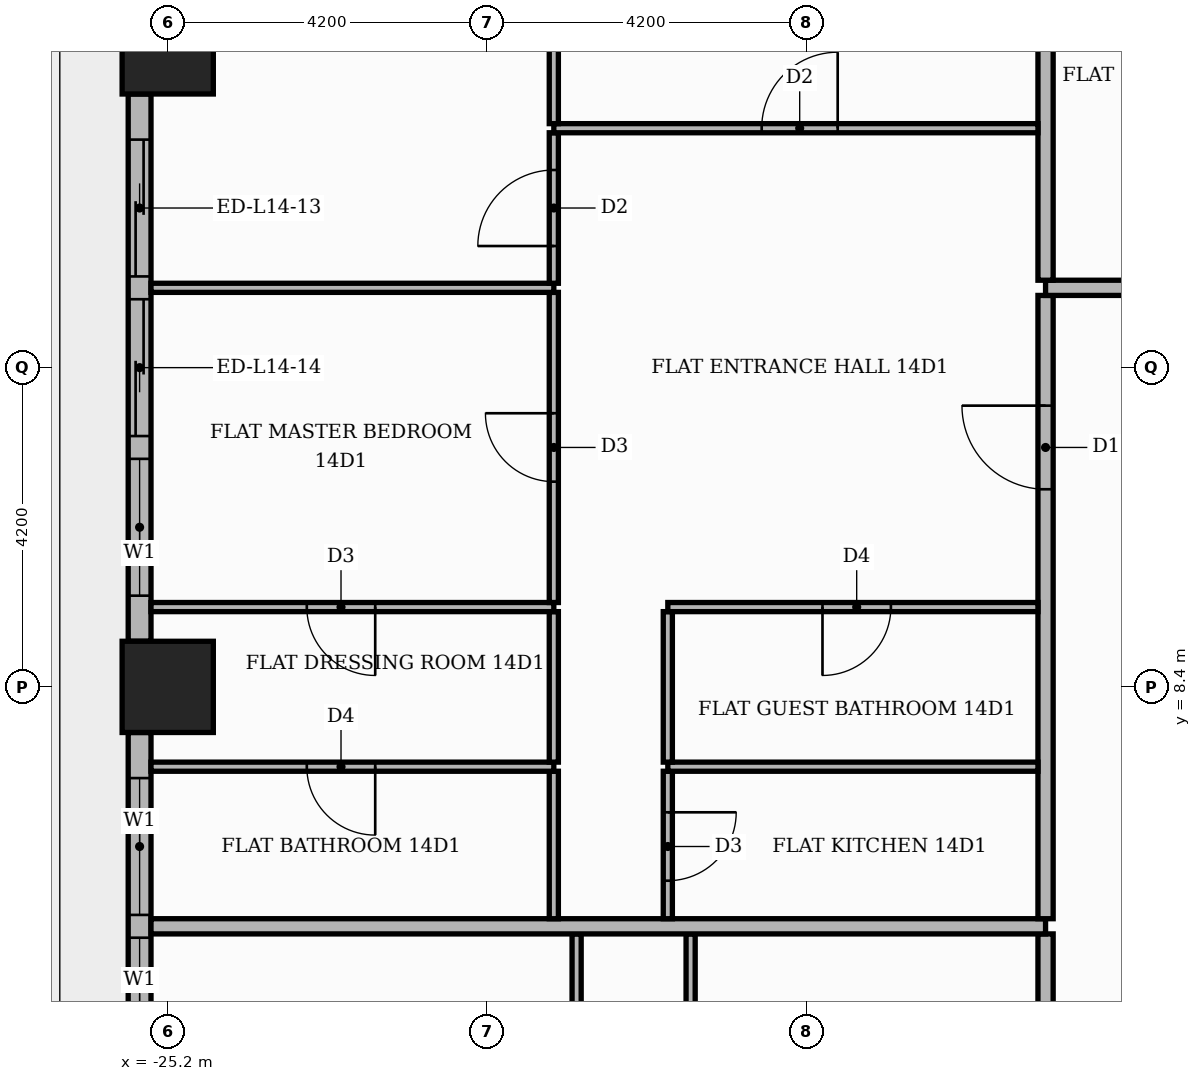
"""IFC4 building model, lengths in metres.
Left out: names, types, materials, properties, quantities, classifications, styles, units other than length and angle.
Written with IfcOpenShell. Run it as: python <this file> out.ifc"""

import sys

from ifc_helpers import new_model, si_unit, direction, frame, frame_2d, origin, origin_2d, place, context, subcontext, project, spatial, rectangle, extrude, element, fill, save


model = new_model("IFC4")
c1 = context("Model", 3, precision=1e-05, world=origin(), true_north=direction((0.0, 1.0)))
c2 = subcontext(c1, "Body", "Model", "MODEL_VIEW")
j1 = project(units=[si_unit("LENGTHUNIT", "METRE"), si_unit("PLANEANGLEUNIT", "RADIAN")], contexts=[c1])
p1 = place(None, origin())
s1 = spatial("IfcSite", under=j1, at=p1, CompositionType="ELEMENT")
p2 = place(p1, origin())
s2 = spatial("IfcBuilding", under=s1, at=p2, CompositionType="ELEMENT")
p3 = place(p2, frame((0.0, 0.0, 62.1)))
s3 = spatial("IfcBuildingStorey", under=s2, at=p3, CompositionType="ELEMENT", Elevation=62.1)
for number, where, z_axis, x_axis in (
    (1, (-25.2, 8.4, 0.0), (0.0, 0.0, 1.0), (1.0, 0.0, 0.0)),
    (2, (-25.2, 16.8, 0.0), (0.0, 0.0, 1.0), (1.0, 0.0, 0.0)),
):
    element("IfcColumn", number, at=place(p3, frame(where, z_axis=z_axis, x_axis=x_axis)), inside=s3, PredefinedType="COLUMN", context=c2, shape_type="SweptSolid", body=[
        extrude(rectangle(XDim=1.2, YDim=1.2, at=origin_2d()), origin(), (0.0, 0.0, 1.0), 3.9),
    ])
p4 = place(p3, frame((-25.57, 16.2, 0.0), z_axis=(0.0, 0.0, 1.0), x_axis=(0.0, -1.0, 0.0)))
e3 = element("IfcWall", 3, at=p4, inside=s3, PredefinedType="STANDARD", context=c2, shape_type="SweptSolid", body=[
    extrude(rectangle(XDim=7.2, YDim=0.3, at=frame_2d((3.6, 0.0))), origin(), (0.0, 0.0, 1.0), 3.48),
])
p5 = place(p4, frame((0.6, 0.0, 0.0)))
e4 = element("IfcOpeningElement", 4, at=p5, cuts=e3, PredefinedType="OPENING", context=c2, shape_type="SweptSolid", body=[
    extrude(rectangle(XDim=1.8, YDim=2.4, at=frame_2d((0.9, 1.2))), frame((0.0, 0.16, 0.0), z_axis=(0.0, -1.0, 0.0), x_axis=(1.0, 0.0, 0.0)), (0.0, 0.0, 1.0), 0.32),
])
p6 = place(p4, frame((2.7, 0.0, 0.0)))
e5 = element("IfcOpeningElement", 5, at=p6, cuts=e3, PredefinedType="OPENING", context=c2, shape_type="SweptSolid", body=[
    extrude(rectangle(XDim=1.8, YDim=2.4, at=frame_2d((0.9, 1.2))), frame((0.0, 0.16, 0.0), z_axis=(0.0, -1.0, 0.0), x_axis=(1.0, 0.0, 0.0)), (0.0, 0.0, 1.0), 0.32),
])
p7 = place(p4, frame((4.8, 0.0, 0.9)))
e6 = element("IfcOpeningElement", 6, at=p7, cuts=e3, PredefinedType="OPENING", context=c2, shape_type="SweptSolid", body=[
    extrude(rectangle(XDim=1.8, YDim=2.1, at=frame_2d((0.9, 1.05))), frame((0.0, 0.16, 0.0), z_axis=(0.0, -1.0, 0.0), x_axis=(1.0, 0.0, 0.0)), (0.0, 0.0, 1.0), 0.32),
])
p8 = place(p3, frame((-25.57, 7.8, 0.0), z_axis=(0.0, 0.0, 1.0), x_axis=(0.0, -1.0, 0.0)))
e7 = element("IfcWall", 7, at=p8, inside=s3, PredefinedType="STANDARD", context=c2, shape_type="SweptSolid", body=[
    extrude(rectangle(XDim=7.2, YDim=0.3, at=frame_2d((3.6, 0.0))), origin(), (0.0, 0.0, 1.0), 3.48),
])
p9 = place(p8, frame((0.6, 0.0, 0.9)))
e8 = element("IfcOpeningElement", 8, at=p9, cuts=e7, PredefinedType="OPENING", context=c2, shape_type="SweptSolid", body=[
    extrude(rectangle(XDim=1.8, YDim=2.1, at=frame_2d((0.9, 1.05))), frame((0.0, 0.16, 0.0), z_axis=(0.0, -1.0, 0.0), x_axis=(1.0, 0.0, 0.0)), (0.0, 0.0, 1.0), 0.32),
])
p10 = place(p8, frame((2.7, 0.0, 0.9)))
e9 = element("IfcOpeningElement", 9, at=p10, cuts=e7, PredefinedType="OPENING", context=c2, shape_type="SweptSolid", body=[
    extrude(rectangle(XDim=1.8, YDim=2.1, at=frame_2d((0.9, 1.05))), frame((0.0, 0.16, 0.0), z_axis=(0.0, -1.0, 0.0), x_axis=(1.0, 0.0, 0.0)), (0.0, 0.0, 1.0), 0.32),
])
p11 = place(p8, frame((4.8, 0.0, 0.0)))
e10 = element("IfcOpeningElement", 10, at=p11, cuts=e7, PredefinedType="OPENING", context=c2, shape_type="SweptSolid", body=[
    extrude(rectangle(XDim=1.8, YDim=2.4, at=frame_2d((0.9, 1.2))), frame((0.0, 0.16, 0.0), z_axis=(0.0, -1.0, 0.0), x_axis=(1.0, 0.0, 0.0)), (0.0, 0.0, 1.0), 0.32),
])
p12 = place(p3, frame((-13.65, -13.55, 0.0), z_axis=(0.0, 0.0, 1.0), x_axis=(0.0, 1.0, 0.0)))
e11 = element("IfcWall", 11, at=p12, inside=s3, PredefinedType="PARTITIONING", context=c2, shape_type="SweptSolid", body=[
    extrude(rectangle(XDim=18.7, YDim=0.2, at=frame_2d((9.35, 0.0))), origin(), (0.0, 0.0, 1.0), 3.48),
])
p13 = place(p12, frame((11.95, 0.0, 0.0)))
e12 = element("IfcOpeningElement", 12, at=p13, cuts=e11, PredefinedType="OPENING", context=c2, shape_type="SweptSolid", body=[
    extrude(rectangle(XDim=1.1, YDim=2.4, at=frame_2d((0.55, 1.2))), frame((0.0, 0.11, 0.0), z_axis=(0.0, -1.0, 0.0), x_axis=(1.0, 0.0, 0.0)), (0.0, 0.0, 1.0), 0.22),
])
p14 = place(p3, frame((-19.82, -3.09, 0.0), z_axis=(0.0, 0.0, 1.0), x_axis=(0.0, 1.0, 0.0)))
e13 = element("IfcWall", 13, at=p14, inside=s3, PredefinedType="PARTITIONING", context=c2, shape_type="SweptSolid", body=[
    extrude(rectangle(XDim=8.24, YDim=0.12, at=frame_2d((4.12, 0.0))), origin(), (0.0, 0.0, 1.0), 3.48),
])
p15 = place(p14, frame((3.64, 0.0, 0.0)))
e14 = element("IfcOpeningElement", 14, at=p15, cuts=e13, PredefinedType="OPENING", context=c2, shape_type="SweptSolid", body=[
    extrude(rectangle(XDim=1.0, YDim=2.1, at=frame_2d((0.5, 1.05))), frame((0.0, 0.07, 0.0), z_axis=(0.0, -1.0, 0.0), x_axis=(1.0, 0.0, 0.0)), (0.0, 0.0, 1.0), 0.14),
])
p16 = place(p3, frame((-18.32, 1.11, 0.0), z_axis=(0.0, 0.0, 1.0), x_axis=(0.0, 1.0, 0.0)))
e15 = element("IfcWall", 15, at=p16, inside=s3, PredefinedType="PARTITIONING", context=c2, shape_type="SweptSolid", body=[
    extrude(rectangle(XDim=4.04, YDim=0.12, at=frame_2d((2.02, 0.0))), origin(), (0.0, 0.0, 1.0), 3.48),
])
p17 = place(p3, frame((-25.42, 5.25, 0.0), z_axis=(0.0, 0.0, 1.0), x_axis=(1.0, 0.0, 0.0)))
e16 = element("IfcWall", 16, at=p17, inside=s3, PredefinedType="PARTITIONING", context=c2, shape_type="SweptSolid", body=[
    extrude(rectangle(XDim=11.77, YDim=0.2, at=frame_2d((5.885, 0.0))), origin(), (0.0, 0.0, 1.0), 3.48),
])
p18 = place(p3, frame((-20.12, 5.35, 0.0), z_axis=(0.0, 0.0, 1.0), x_axis=(0.0, 1.0, 0.0)))
e17 = element("IfcWall", 17, at=p18, inside=s3, PredefinedType="PARTITIONING", context=c2, shape_type="SweptSolid", body=[
    extrude(rectangle(XDim=1.94, YDim=0.12, at=frame_2d((0.97, 0.0))), origin(), (0.0, 0.0, 1.0), 3.48),
])
p19 = place(p3, frame((-18.62, 5.35, 0.0), z_axis=(0.0, 0.0, 1.0), x_axis=(0.0, 1.0, 0.0)))
e18 = element("IfcWall", 18, at=p19, inside=s3, PredefinedType="PARTITIONING", context=c2, shape_type="SweptSolid", body=[
    extrude(rectangle(XDim=1.94, YDim=0.12, at=frame_2d((0.97, 0.0))), origin(), (0.0, 0.0, 1.0), 3.48),
])
p20 = place(p19, frame((0.5, 0.0, 0.0)))
e19 = element("IfcOpeningElement", 19, at=p20, cuts=e18, PredefinedType="OPENING", context=c2, shape_type="SweptSolid", body=[
    extrude(rectangle(XDim=0.9, YDim=2.1, at=frame_2d((0.45, 1.05))), frame((0.0, 0.07, 0.0), z_axis=(0.0, -1.0, 0.0), x_axis=(1.0, 0.0, 0.0)), (0.0, 0.0, 1.0), 0.14),
])
p21 = place(p3, frame((-13.65, 5.35, 0.0), z_axis=(0.0, 0.0, 1.0), x_axis=(0.0, 1.0, 0.0)))
e20 = element("IfcWall", 20, at=p21, inside=s3, PredefinedType="PARTITIONING", context=c2, shape_type="SweptSolid", body=[
    extrude(rectangle(XDim=8.2, YDim=0.2, at=frame_2d((4.1, 0.0))), origin(), (0.0, 0.0, 1.0), 3.48),
])
p22 = place(p21, frame((5.65, 0.0, 0.0)))
e21 = element("IfcOpeningElement", 21, at=p22, cuts=e20, PredefinedType="OPENING", context=c2, shape_type="SweptSolid", body=[
    extrude(rectangle(XDim=1.1, YDim=2.4, at=frame_2d((0.55, 1.2))), frame((0.0, 0.11, 0.0), z_axis=(0.0, -1.0, 0.0), x_axis=(1.0, 0.0, 0.0)), (0.0, 0.0, 1.0), 0.22),
])
p23 = place(p3, frame((-25.42, 7.35, 0.0), z_axis=(0.0, 0.0, 1.0), x_axis=(1.0, 0.0, 0.0)))
e22 = element("IfcWall", 22, at=p23, inside=s3, PredefinedType="PARTITIONING", context=c2, shape_type="SweptSolid", body=[
    extrude(rectangle(XDim=5.3, YDim=0.12, at=frame_2d((2.65, 0.0))), origin(), (0.0, 0.0, 1.0), 3.48),
])
p24 = place(p23, frame((2.05, 0.0, 0.0)))
e23 = element("IfcOpeningElement", 23, at=p24, cuts=e22, PredefinedType="OPENING", context=c2, shape_type="SweptSolid", body=[
    extrude(rectangle(XDim=0.9, YDim=2.1, at=frame_2d((0.45, 1.05))), frame((0.0, 0.07, 0.0), z_axis=(0.0, -1.0, 0.0), x_axis=(1.0, 0.0, 0.0)), (0.0, 0.0, 1.0), 0.14),
])
p25 = place(p3, frame((-18.62, 7.35, 0.0), z_axis=(0.0, 0.0, 1.0), x_axis=(1.0, 0.0, 0.0)))
e24 = element("IfcWall", 24, at=p25, inside=s3, PredefinedType="PARTITIONING", context=c2, shape_type="SweptSolid", body=[
    extrude(rectangle(XDim=4.87, YDim=0.12, at=frame_2d((2.435, 0.0))), origin(), (0.0, 0.0, 1.0), 3.48),
])
for number, where, z_axis, x_axis in (
    (25, (-20.12, 7.41, 0.0), (0.0, 0.0, 1.0), (0.0, 1.0, 0.0)),
    (26, (-18.62, 7.41, 0.0), (0.0, 0.0, 1.0), (0.0, 1.0, 0.0)),
):
    element("IfcWall", number, at=place(p3, frame(where, z_axis=z_axis, x_axis=x_axis)), inside=s3, PredefinedType="PARTITIONING", context=c2, shape_type="SweptSolid", body=[
        extrude(rectangle(XDim=1.98, YDim=0.12, at=frame_2d((0.99, 0.0))), origin(), (0.0, 0.0, 1.0), 3.48),
    ])
p26 = place(p3, frame((-25.42, 9.45, 0.0), z_axis=(0.0, 0.0, 1.0), x_axis=(1.0, 0.0, 0.0)))
e27 = element("IfcWall", 27, at=p26, inside=s3, PredefinedType="PARTITIONING", context=c2, shape_type="SweptSolid", body=[
    extrude(rectangle(XDim=5.3, YDim=0.12, at=frame_2d((2.65, 0.0))), origin(), (0.0, 0.0, 1.0), 3.48),
])
p27 = place(p26, frame((2.05, 0.0, 0.0)))
e28 = element("IfcOpeningElement", 28, at=p27, cuts=e27, PredefinedType="OPENING", context=c2, shape_type="SweptSolid", body=[
    extrude(rectangle(XDim=0.9, YDim=2.1, at=frame_2d((0.45, 1.05))), frame((0.0, 0.07, 0.0), z_axis=(0.0, -1.0, 0.0), x_axis=(1.0, 0.0, 0.0)), (0.0, 0.0, 1.0), 0.14),
])
p28 = place(p3, frame((-18.62, 9.45, 0.0), z_axis=(0.0, 0.0, 1.0), x_axis=(1.0, 0.0, 0.0)))
e29 = element("IfcWall", 29, at=p28, inside=s3, PredefinedType="PARTITIONING", context=c2, shape_type="SweptSolid", body=[
    extrude(rectangle(XDim=4.87, YDim=0.12, at=frame_2d((2.435, 0.0))), origin(), (0.0, 0.0, 1.0), 3.48),
])
p29 = place(p28, frame((2.035, 0.0, 0.0)))
e30 = element("IfcOpeningElement", 30, at=p29, cuts=e29, PredefinedType="OPENING", context=c2, shape_type="SweptSolid", body=[
    extrude(rectangle(XDim=0.9, YDim=2.1, at=frame_2d((0.45, 1.05))), frame((0.0, 0.07, 0.0), z_axis=(0.0, -1.0, 0.0), x_axis=(1.0, 0.0, 0.0)), (0.0, 0.0, 1.0), 0.14),
])
p30 = place(p3, frame((-20.12, 9.51, 0.0), z_axis=(0.0, 0.0, 1.0), x_axis=(0.0, 1.0, 0.0)))
e31 = element("IfcWall", 31, at=p30, inside=s3, PredefinedType="PARTITIONING", context=c2, shape_type="SweptSolid", body=[
    extrude(rectangle(XDim=4.08, YDim=0.12, at=frame_2d((2.04, 0.0))), origin(), (0.0, 0.0, 1.0), 3.48),
])
p31 = place(p30, frame((1.59, 0.0, 0.0)))
e32 = element("IfcOpeningElement", 32, at=p31, cuts=e31, PredefinedType="OPENING", context=c2, shape_type="SweptSolid", body=[
    extrude(rectangle(XDim=0.9, YDim=2.1, at=frame_2d((0.45, 1.05))), frame((0.0, 0.07, 0.0), z_axis=(0.0, -1.0, 0.0), x_axis=(1.0, 0.0, 0.0)), (0.0, 0.0, 1.0), 0.14),
])
p32 = place(p3, frame((-25.42, 13.65, 0.0), z_axis=(0.0, 0.0, 1.0), x_axis=(1.0, 0.0, 0.0)))
e33 = element("IfcWall", 33, at=p32, inside=s3, PredefinedType="PARTITIONING", context=c2, shape_type="SweptSolid", body=[
    extrude(rectangle(XDim=5.3, YDim=0.12, at=frame_2d((2.65, 0.0))), origin(), (0.0, 0.0, 1.0), 3.48),
])
p33 = place(p3, frame((-13.65, 13.65, 0.0), z_axis=(0.0, 0.0, 1.0), x_axis=(1.0, 0.0, 0.0)))
e34 = element("IfcWall", 34, at=p33, inside=s3, PredefinedType="PARTITIONING", context=c2, shape_type="SweptSolid", body=[
    extrude(rectangle(XDim=39.07, YDim=0.2, at=frame_2d((19.535, 0.0))), origin(), (0.0, 0.0, 1.0), 3.48),
])
p34 = place(p33, frame((23.6, 0.0, 0.0)))
e35 = element("IfcOpeningElement", 35, at=p34, cuts=e34, PredefinedType="OPENING", context=c2, shape_type="SweptSolid", body=[
    extrude(rectangle(XDim=1.1, YDim=2.4, at=frame_2d((0.55, 1.2))), frame((0.0, 0.11, 0.0), z_axis=(0.0, -1.0, 0.0), x_axis=(1.0, 0.0, 0.0)), (0.0, 0.0, 1.0), 0.22),
])
p35 = place(p3, frame((-20.12, 13.71, 0.0), z_axis=(0.0, 0.0, 1.0), x_axis=(0.0, 1.0, 0.0)))
e36 = element("IfcWall", 36, at=p35, inside=s3, PredefinedType="PARTITIONING", context=c2, shape_type="SweptSolid", body=[
    extrude(rectangle(XDim=1.98, YDim=0.12, at=frame_2d((0.99, 0.0))), origin(), (0.0, 0.0, 1.0), 3.48),
])
p36 = place(p35, frame((0.49, 0.0, 0.0)))
e37 = element("IfcOpeningElement", 37, at=p36, cuts=e36, PredefinedType="OPENING", context=c2, shape_type="SweptSolid", body=[
    extrude(rectangle(XDim=1.0, YDim=2.1, at=frame_2d((0.5, 1.05))), frame((0.0, 0.07, 0.0), z_axis=(0.0, -1.0, 0.0), x_axis=(1.0, 0.0, 0.0)), (0.0, 0.0, 1.0), 0.14),
])
p37 = place(p3, frame((-13.65, 13.75, 0.0), z_axis=(0.0, 0.0, 1.0), x_axis=(0.0, 1.0, 0.0)))
e38 = element("IfcWall", 38, at=p37, inside=s3, PredefinedType="PARTITIONING", context=c2, shape_type="SweptSolid", body=[
    extrude(rectangle(XDim=11.67, YDim=0.2, at=frame_2d((5.835, 0.0))), origin(), (0.0, 0.0, 1.0), 3.48),
])
p38 = place(p3, frame((-20.12, 15.75, 0.0), z_axis=(0.0, 0.0, 1.0), x_axis=(1.0, 0.0, 0.0)))
e39 = element("IfcWall", 39, at=p38, inside=s3, PredefinedType="PARTITIONING", context=c2, shape_type="SweptSolid", body=[
    extrude(rectangle(XDim=6.37, YDim=0.12, at=frame_2d((3.185, 0.0))), origin(), (0.0, 0.0, 1.0), 3.48),
])
p39 = place(p38, frame((2.735, 0.0, 0.0)))
e40 = element("IfcOpeningElement", 40, at=p39, cuts=e39, PredefinedType="OPENING", context=c2, shape_type="SweptSolid", body=[
    extrude(rectangle(XDim=1.0, YDim=2.1, at=frame_2d((0.5, 1.05))), frame((0.0, 0.07, 0.0), z_axis=(0.0, -1.0, 0.0), x_axis=(1.0, 0.0, 0.0)), (0.0, 0.0, 1.0), 0.14),
])
p40 = place(p3, frame((-20.12, 15.81, 0.0), z_axis=(0.0, 0.0, 1.0), x_axis=(0.0, 1.0, 0.0)))
e41 = element("IfcWall", 41, at=p40, inside=s3, PredefinedType="PARTITIONING", context=c2, shape_type="SweptSolid", body=[
    extrude(rectangle(XDim=1.49, YDim=0.12, at=frame_2d((0.745, 0.0))), origin(), (0.0, 0.0, 1.0), 3.48),
])
p41 = place(p5, origin())
e42 = element("IfcDoor", 42, at=p41, inside=s3, OperationType="SLIDING_TO_LEFT", PredefinedType="DOOR", context=c2, shape_type="SweptSolid", body=[
    extrude(rectangle(XDim=1.8, YDim=2.4, at=frame_2d((0.9, 1.2))), frame((0.0, 0.025, 0.0), z_axis=(0.0, -1.0, 0.0), x_axis=(1.0, 0.0, 0.0)), (0.0, 0.0, 1.0), 0.05),
])
fill(e4, e42)
p42 = place(p6, origin())
e43 = element("IfcDoor", 43, at=p42, inside=s3, OperationType="SLIDING_TO_RIGHT", PredefinedType="DOOR", context=c2, shape_type="SweptSolid", body=[
    extrude(rectangle(XDim=1.8, YDim=2.4, at=frame_2d((0.9, 1.2))), frame((0.0, 0.025, 0.0), z_axis=(0.0, -1.0, 0.0), x_axis=(1.0, 0.0, 0.0)), (0.0, 0.0, 1.0), 0.05),
])
fill(e5, e43)
p43 = place(p7, origin())
e44 = element("IfcWindow", 44, at=p43, inside=s3, PartitioningType="SINGLE_PANEL", PredefinedType="WINDOW", context=c2, shape_type="SweptSolid", body=[
    extrude(rectangle(XDim=1.8, YDim=2.1, at=frame_2d((0.9, 1.05))), frame((0.0, 0.03, 0.0), z_axis=(0.0, -1.0, 0.0), x_axis=(1.0, 0.0, 0.0)), (0.0, 0.0, 1.0), 0.06),
])
fill(e6, e44)
p44 = place(p9, origin())
e45 = element("IfcWindow", 45, at=p44, inside=s3, PartitioningType="SINGLE_PANEL", PredefinedType="WINDOW", context=c2, shape_type="SweptSolid", body=[
    extrude(rectangle(XDim=1.8, YDim=2.1, at=frame_2d((0.9, 1.05))), frame((0.0, 0.03, 0.0), z_axis=(0.0, -1.0, 0.0), x_axis=(1.0, 0.0, 0.0)), (0.0, 0.0, 1.0), 0.06),
])
fill(e8, e45)
p45 = place(p10, origin())
e46 = element("IfcWindow", 46, at=p45, inside=s3, PartitioningType="SINGLE_PANEL", PredefinedType="WINDOW", context=c2, shape_type="SweptSolid", body=[
    extrude(rectangle(XDim=1.8, YDim=2.1, at=frame_2d((0.9, 1.05))), frame((0.0, 0.03, 0.0), z_axis=(0.0, -1.0, 0.0), x_axis=(1.0, 0.0, 0.0)), (0.0, 0.0, 1.0), 0.06),
])
fill(e9, e46)
p46 = place(p22, origin())
e47 = element("IfcDoor", 47, at=p46, inside=s3, OperationType="SINGLE_SWING_RIGHT", PredefinedType="DOOR", context=c2, shape_type="SweptSolid", body=[
    extrude(rectangle(XDim=1.1, YDim=2.4, at=frame_2d((0.55, 1.2))), frame((0.0, 0.025, 0.0), z_axis=(0.0, -1.0, 0.0), x_axis=(1.0, 0.0, 0.0)), (0.0, 0.0, 1.0), 0.05),
])
fill(e21, e47)
p47 = place(p39, origin())
e48 = element("IfcDoor", 48, at=p47, inside=s3, OperationType="SINGLE_SWING_RIGHT", PredefinedType="DOOR", context=c2, shape_type="SweptSolid", body=[
    extrude(rectangle(XDim=1.0, YDim=2.1, at=frame_2d((0.5, 1.05))), frame((0.0, 0.025, 0.0), z_axis=(0.0, -1.0, 0.0), x_axis=(1.0, 0.0, 0.0)), (0.0, 0.0, 1.0), 0.05),
])
fill(e40, e48)
p48 = place(p29, frame((0.9, 0.0, 0.0), z_axis=(0.0, 0.0, 1.0), x_axis=(-1.0, 0.0, 0.0)))
e49 = element("IfcDoor", 49, at=p48, inside=s3, OperationType="SINGLE_SWING_LEFT", PredefinedType="DOOR", context=c2, shape_type="SweptSolid", body=[
    extrude(rectangle(XDim=0.9, YDim=2.1, at=frame_2d((0.45, 1.05))), frame((0.0, 0.025, 0.0), z_axis=(0.0, -1.0, 0.0), x_axis=(1.0, 0.0, 0.0)), (0.0, 0.0, 1.0), 0.05),
])
fill(e30, e49)
p49 = place(p20, frame((0.9, 0.0, 0.0), z_axis=(0.0, 0.0, 1.0), x_axis=(-1.0, 0.0, 0.0)))
e50 = element("IfcDoor", 50, at=p49, inside=s3, OperationType="SINGLE_SWING_RIGHT", PredefinedType="DOOR", context=c2, shape_type="SweptSolid", body=[
    extrude(rectangle(XDim=0.9, YDim=2.1, at=frame_2d((0.45, 1.05))), frame((0.0, 0.025, 0.0), z_axis=(0.0, -1.0, 0.0), x_axis=(1.0, 0.0, 0.0)), (0.0, 0.0, 1.0), 0.05),
])
fill(e19, e50)
p50 = place(p36, origin())
e51 = element("IfcDoor", 51, at=p50, inside=s3, OperationType="SINGLE_SWING_LEFT", PredefinedType="DOOR", context=c2, shape_type="SweptSolid", body=[
    extrude(rectangle(XDim=1.0, YDim=2.1, at=frame_2d((0.5, 1.05))), frame((0.0, 0.025, 0.0), z_axis=(0.0, -1.0, 0.0), x_axis=(1.0, 0.0, 0.0)), (0.0, 0.0, 1.0), 0.05),
])
fill(e37, e51)
p51 = place(p31, origin())
e52 = element("IfcDoor", 52, at=p51, inside=s3, OperationType="SINGLE_SWING_RIGHT", PredefinedType="DOOR", context=c2, shape_type="SweptSolid", body=[
    extrude(rectangle(XDim=0.9, YDim=2.1, at=frame_2d((0.45, 1.05))), frame((0.0, 0.025, 0.0), z_axis=(0.0, -1.0, 0.0), x_axis=(1.0, 0.0, 0.0)), (0.0, 0.0, 1.0), 0.05),
])
fill(e32, e52)
p52 = place(p27, frame((0.9, 0.0, 0.0), z_axis=(0.0, 0.0, 1.0), x_axis=(-1.0, 0.0, 0.0)))
e53 = element("IfcDoor", 53, at=p52, inside=s3, OperationType="SINGLE_SWING_RIGHT", PredefinedType="DOOR", context=c2, shape_type="SweptSolid", body=[
    extrude(rectangle(XDim=0.9, YDim=2.1, at=frame_2d((0.45, 1.05))), frame((0.0, 0.025, 0.0), z_axis=(0.0, -1.0, 0.0), x_axis=(1.0, 0.0, 0.0)), (0.0, 0.0, 1.0), 0.05),
])
fill(e28, e53)
p53 = place(p24, frame((0.9, 0.0, 0.0), z_axis=(0.0, 0.0, 1.0), x_axis=(-1.0, 0.0, 0.0)))
e54 = element("IfcDoor", 54, at=p53, inside=s3, OperationType="SINGLE_SWING_RIGHT", PredefinedType="DOOR", context=c2, shape_type="SweptSolid", body=[
    extrude(rectangle(XDim=0.9, YDim=2.1, at=frame_2d((0.45, 1.05))), frame((0.0, 0.025, 0.0), z_axis=(0.0, -1.0, 0.0), x_axis=(1.0, 0.0, 0.0)), (0.0, 0.0, 1.0), 0.05),
])
fill(e23, e54)
save(model, sys.argv[1])
